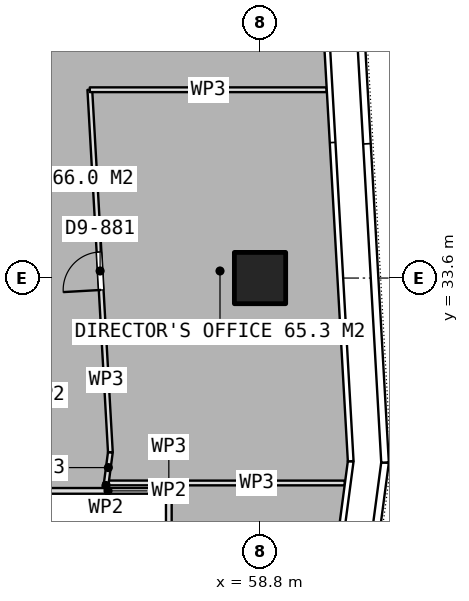
"""IFC4 building model, lengths in metres.
Left out: names, types, materials, properties, quantities, classifications, styles, units other than length and angle.
Written with IfcOpenShell. Run it as: python <this file> out.ifc"""

import sys

from ifc_helpers import new_model, si_unit, direction, frame, frame_2d, origin, origin_2d, place, context, subcontext, project, spatial, rectangle, extrude, element, fill, save


model = new_model("IFC4")
c1 = context("Model", 3, precision=1e-05, world=origin(), true_north=direction((0.0, 1.0)))
c2 = subcontext(c1, "Body", "Model", "MODEL_VIEW")
j1 = project(units=[si_unit("LENGTHUNIT", "METRE"), si_unit("PLANEANGLEUNIT", "RADIAN")], contexts=[c1])
p1 = place(None, origin())
s1 = spatial("IfcSite", under=j1, at=p1, CompositionType="ELEMENT")
p2 = place(p1, origin())
s2 = spatial("IfcBuilding", under=s1, at=p2, CompositionType="ELEMENT")
p3 = place(p2, frame((0.0, 0.0, 221.45)))
s3 = spatial("IfcBuildingStorey", under=s2, at=p3, CompositionType="ELEMENT", Elevation=221.45)
p4 = place(p3, frame((58.8, 33.6, 0.0), z_axis=(0.0, 0.0, 1.0), x_axis=(1.0, 0.0, 0.0)))
e1 = element("IfcColumn", 1, at=p4, inside=s3, PredefinedType="COLUMN", context=c2, shape_type="SweptSolid", body=[
    extrude(rectangle(XDim=1.35, YDim=1.35, at=origin_2d()), origin(), (0.0, 0.0, 1.0), 3.75),
])
p5 = place(p3, frame((53.125, 28.0, 0.0), z_axis=(0.0, 0.0, 1.0), x_axis=(1.0, 0.0, 0.0)))
e2 = element("IfcWall", 2, at=p5, inside=s3, PredefinedType="PARTITIONING", context=c2, shape_type="SweptSolid", body=[
    extrude(rectangle(XDim=3.35, YDim=0.15, at=frame_2d((1.675, 0.0))), origin(), (0.0, 0.0, 1.0), 3.5),
])
p6 = place(p3, frame((56.4, 21.075, 0.0), z_axis=(0.0, 0.0, 1.0), x_axis=(0.0, 1.0, 0.0)))
e3 = element("IfcWall", 3, at=p6, inside=s3, PredefinedType="PARTITIONING", context=c2, shape_type="SweptSolid", body=[
    extrude(rectangle(XDim=6.85, YDim=0.15, at=frame_2d((3.425, 0.0))), origin(), (0.0, 0.0, 1.0), 3.5),
])
p7 = place(p3, frame((56.4, 27.925, 0.0), z_axis=(0.0, 0.0, 1.0), x_axis=(0.0, 1.0, 0.0)))
e4 = element("IfcWall", 4, at=p7, inside=s3, PredefinedType="PARTITIONING", context=c2, shape_type="SweptSolid", body=[
    extrude(rectangle(XDim=0.283, YDim=0.125, at=frame_2d((0.142, 0.0))), origin(), (0.0, 0.0, 1.0), 3.5),
])
p8 = place(p3, frame((56.4, 28.208, 0.0), z_axis=(0.0, 0.0, 1.0), x_axis=(1.0, 0.0, 0.0)))
e5 = element("IfcWall", 5, at=p8, inside=s3, PredefinedType="PARTITIONING", context=c2, shape_type="SweptSolid", body=[
    extrude(rectangle(XDim=4.63, YDim=0.125, at=frame_2d((2.315, 0.0))), origin(), (0.0, 0.0, 1.0), 3.5),
])
p9 = place(p3, frame((54.321, 38.555, 0.0), z_axis=(0.0, 0.0, 1.0), x_axis=(1.0, 0.0, 0.0)))
e6 = element("IfcWall", 6, at=p9, inside=s3, PredefinedType="PARTITIONING", context=c2, shape_type="SweptSolid", body=[
    extrude(rectangle(XDim=6.23, YDim=0.125, at=frame_2d((3.115, 0.0))), origin(), (0.0, 0.0, 1.0), 3.5),
])
p10 = place(p3, frame((56.4, 28.209, 0.0), z_axis=(0.0, 0.0, 1.0), x_axis=(-1.0, 0.0, 0.0)))
e7 = element("IfcWall", 7, at=p10, inside=s3, PredefinedType="PARTITIONING", context=c2, shape_type="SweptSolid", body=[
    extrude(rectangle(XDim=1.645, YDim=0.125, at=frame_2d((0.823, 0.0))), origin(), (0.0, 0.0, 1.0), 3.5),
])
p11 = place(p3, frame((54.755, 28.209, 0.0), z_axis=(0.0, 0.0, 1.0), x_axis=(0.131477079609, 0.991319210717, 0.0)))
e8 = element("IfcWall", 8, at=p11, inside=s3, PredefinedType="PARTITIONING", context=c2, shape_type="SweptSolid", body=[
    extrude(rectangle(XDim=0.815, YDim=0.125, at=frame_2d((0.408, 0.0))), origin(), (0.0, 0.0, 1.0), 3.5),
])
p12 = place(p3, frame((54.862, 29.017, 0.0), z_axis=(0.0, 0.0, 1.0), x_axis=(-0.056632031714, 0.99839511867, 0.0)))
e9 = element("IfcWall", 9, at=p12, inside=s3, PredefinedType="PARTITIONING", context=c2, shape_type="SweptSolid", body=[
    extrude(rectangle(XDim=9.553, YDim=0.125, at=frame_2d((4.777, 0.0))), origin(), (0.0, 0.0, 1.0), 3.5),
])
p13 = place(p12, frame((4.277, 0.0, 0.0)))
e10 = element("IfcOpeningElement", 10, at=p13, cuts=e9, PredefinedType="OPENING", context=c2, shape_type="SweptSolid", body=[
    extrude(rectangle(XDim=1.0, YDim=2.1, at=frame_2d((0.5, 1.05))), frame((0.0, 0.073, 0.0), z_axis=(0.0, -1.0, 0.0), x_axis=(1.0, 0.0, 0.0)), (0.0, 0.0, 1.0), 0.145),
])
p14 = place(p3, frame((54.755, 28.208, 0.0), z_axis=(0.0, 0.0, 1.0), x_axis=(-0.125602865169, -0.992080601696, 0.0)))
e11 = element("IfcWall", 11, at=p14, inside=s3, PredefinedType="PARTITIONING", context=c2, shape_type="SweptSolid", body=[
    extrude(rectangle(XDim=0.134, YDim=0.15, at=frame_2d((0.067, 0.0))), origin(), (0.0, 0.0, 1.0), 3.5),
])
p15 = place(p13, origin())
e12 = element("IfcDoor", 12, at=p15, inside=s3, OperationType="SINGLE_SWING_LEFT", PredefinedType="DOOR", context=c2, shape_type="SweptSolid", body=[
    extrude(rectangle(XDim=1.0, YDim=2.1, at=frame_2d((0.5, 1.05))), frame((0.0, 0.025, 0.0), z_axis=(0.0, -1.0, 0.0), x_axis=(1.0, 0.0, 0.0)), (0.0, 0.0, 1.0), 0.05),
])
fill(e10, e12)
save(model, sys.argv[1])
